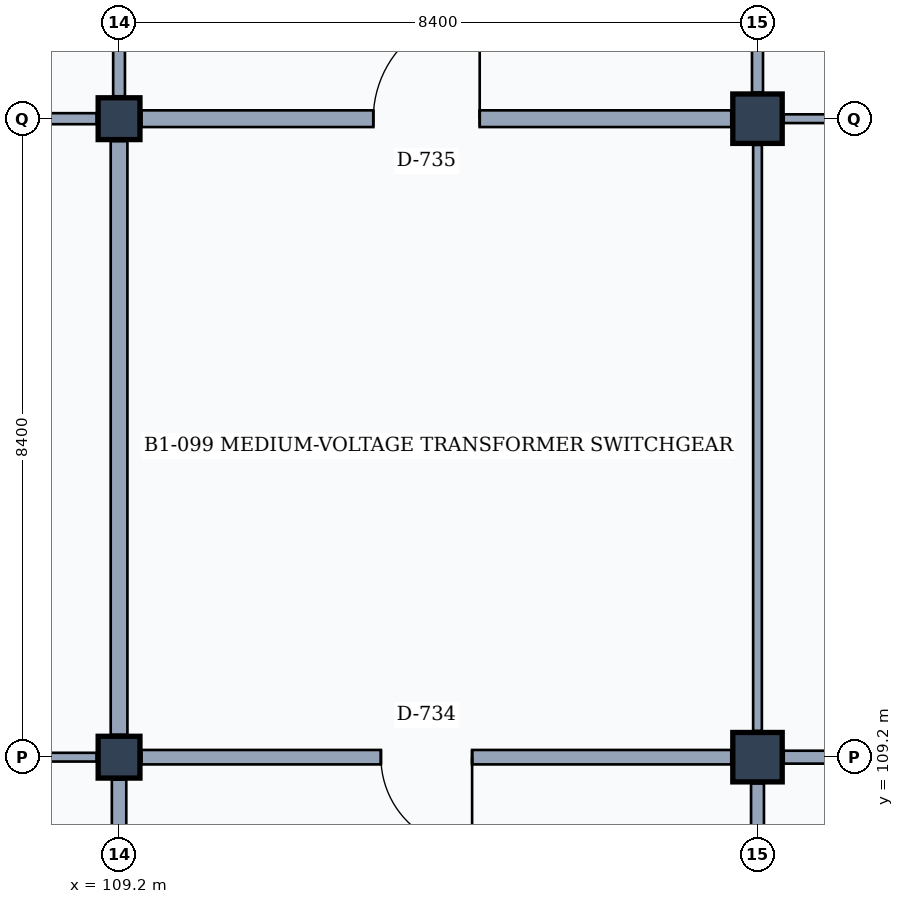
"""IFC4 building model, lengths in metres.
Left out: names, types, materials, properties, quantities, classifications, styles, units other than length and angle.
Written with IfcOpenShell. Run it as: python <this file> out.ifc"""

import sys

from ifc_helpers import new_model, si_unit, direction, frame, frame_2d, origin, origin_2d, place, context, subcontext, project, spatial, rectangle, extrude, element, fill, save


model = new_model("IFC4")
c1 = context("Model", 3, precision=1e-05, world=origin(), true_north=direction((0.0, 1.0)))
c2 = subcontext(c1, "Body", "Model", "MODEL_VIEW")
j1 = project(units=[si_unit("LENGTHUNIT", "METRE"), si_unit("PLANEANGLEUNIT", "RADIAN")], contexts=[c1])
p1 = place(None, origin())
s1 = spatial("IfcSite", under=j1, at=p1, CompositionType="ELEMENT")
p2 = place(p1, origin())
s2 = spatial("IfcBuilding", under=s1, at=p2, CompositionType="ELEMENT")
p3 = place(p2, frame((0.0, 0.0, -4.2)))
s3 = spatial("IfcBuildingStorey", under=s2, at=p3, CompositionType="ELEMENT", Elevation=-4.2)
for number, where, z_axis, x_axis in (
    (1, (109.2, 109.2, 0.0), (0.0, 0.0, 1.0), (1.0, 0.0, 0.0)),
    (2, (109.2, 117.6, 0.0), (0.0, 0.0, 1.0), (1.0, 0.0, 0.0)),
):
    element("IfcColumn", number, at=place(p3, frame(where, z_axis=z_axis, x_axis=x_axis)), inside=s3, PredefinedType="COLUMN", context=c2, shape_type="SweptSolid", body=[
        extrude(rectangle(XDim=0.55, YDim=0.55, at=origin_2d()), origin(), (0.0, 0.0, 1.0), 4.2),
    ])
for number, where, z_axis, x_axis in (
    (3, (117.6, 109.2, 0.0), (0.0, 0.0, 1.0), (1.0, 0.0, 0.0)),
    (4, (117.6, 117.6, 0.0), (0.0, 0.0, 1.0), (1.0, 0.0, 0.0)),
):
    element("IfcColumn", number, at=place(p3, frame(where, z_axis=z_axis, x_axis=x_axis)), inside=s3, PredefinedType="COLUMN", context=c2, shape_type="SweptSolid", body=[
        extrude(rectangle(XDim=0.65, YDim=0.65, at=origin_2d()), origin(), (0.0, 0.0, 1.0), 4.2),
    ])
p4 = place(p3, frame((109.2, 101.095, 0.0), z_axis=(0.0, 0.0, 1.0), x_axis=(0.0, 1.0, 0.0)))
e5 = element("IfcWall", 5, at=p4, inside=s3, PredefinedType="PARTITIONING", context=c2, shape_type="SweptSolid", body=[
    extrude(rectangle(XDim=7.81, YDim=0.19, at=frame_2d((3.905, 0.0))), origin(), (0.0, 0.0, 1.0), 3.23),
])
p5 = place(p4, frame((3.3, 0.0, 0.0)))
e6 = element("IfcOpeningElement", 6, at=p5, cuts=e5, PredefinedType="OPENING", context=c2, shape_type="SweptSolid", body=[
    extrude(rectangle(XDim=0.9, YDim=2.1, at=frame_2d((0.45, 1.05))), frame((0.0, 0.105, 0.0), z_axis=(0.0, -1.0, 0.0), x_axis=(1.0, 0.0, 0.0)), (0.0, 0.0, 1.0), 0.21),
])
p6 = place(p3, frame((101.095, 109.2, 0.0), z_axis=(0.0, 0.0, 1.0), x_axis=(1.0, 0.0, 0.0)))
e7 = element("IfcWall", 7, at=p6, inside=s3, PredefinedType="PARTITIONING", context=c2, shape_type="SweptSolid", body=[
    extrude(rectangle(XDim=7.81, YDim=0.115, at=frame_2d((3.905, 0.0))), origin(), (0.0, 0.0, 1.0), 2.93),
])
p7 = place(p6, frame((3.125, 0.0, 0.0)))
e8 = element("IfcOpeningElement", 8, at=p7, cuts=e7, PredefinedType="OPENING", context=c2, shape_type="SweptSolid", body=[
    extrude(rectangle(XDim=1.25, YDim=2.3, at=frame_2d((0.625, 1.15))), frame((0.0, 0.067, 0.0), z_axis=(0.0, -1.0, 0.0), x_axis=(1.0, 0.0, 0.0)), (0.0, 0.0, 1.0), 0.135),
])
p8 = place(p3, frame((109.2, 109.495, 0.0), z_axis=(0.0, 0.0, 1.0), x_axis=(0.0, 1.0, 0.0)))
e9 = element("IfcWall", 9, at=p8, inside=s3, PredefinedType="PARTITIONING", context=c2, shape_type="SweptSolid", body=[
    extrude(rectangle(XDim=7.81, YDim=0.22, at=frame_2d((3.905, 0.0))), origin(), (0.0, 0.0, 1.0), 3.23),
])
p9 = place(p3, frame((101.095, 117.6, 0.0), z_axis=(0.0, 0.0, 1.0), x_axis=(1.0, 0.0, 0.0)))
e10 = element("IfcWall", 10, at=p9, inside=s3, PredefinedType="PARTITIONING", context=c2, shape_type="SweptSolid", body=[
    extrude(rectangle(XDim=7.81, YDim=0.145, at=frame_2d((3.905, 0.0))), origin(), (0.0, 0.0, 1.0), 2.93),
])
p10 = place(p9, frame((3.075, 0.0, 0.0)))
e11 = element("IfcOpeningElement", 11, at=p10, cuts=e10, PredefinedType="OPENING", context=c2, shape_type="SweptSolid", body=[
    extrude(rectangle(XDim=1.35, YDim=2.25, at=frame_2d((0.675, 1.125))), frame((0.0, 0.083, 0.0), z_axis=(0.0, -1.0, 0.0), x_axis=(1.0, 0.0, 0.0)), (0.0, 0.0, 1.0), 0.165),
])
p11 = place(p3, frame((109.2, 117.895, 0.0), z_axis=(0.0, 0.0, 1.0), x_axis=(0.0, 1.0, 0.0)))
e12 = element("IfcWall", 12, at=p11, inside=s3, PredefinedType="PARTITIONING", context=c2, shape_type="SweptSolid", body=[
    extrude(rectangle(XDim=7.81, YDim=0.155, at=frame_2d((3.905, 0.0))), origin(), (0.0, 0.0, 1.0), 3.23),
])
p12 = place(p3, frame((117.6, 101.145, 0.0), z_axis=(0.0, 0.0, 1.0), x_axis=(0.0, 1.0, 0.0)))
e13 = element("IfcWall", 13, at=p12, inside=s3, PredefinedType="PARTITIONING", context=c2, shape_type="SweptSolid", body=[
    extrude(rectangle(XDim=7.71, YDim=0.17, at=frame_2d((3.855, 0.0))), origin(), (0.0, 0.0, 1.0), 3.23),
])
p13 = place(p3, frame((109.495, 109.2, 0.0), z_axis=(0.0, 0.0, 1.0), x_axis=(1.0, 0.0, 0.0)))
e14 = element("IfcWall", 14, at=p13, inside=s3, PredefinedType="PARTITIONING", context=c2, shape_type="SweptSolid", body=[
    extrude(rectangle(XDim=7.76, YDim=0.19, at=frame_2d((3.88, 0.0))), origin(), (0.0, 0.0, 1.0), 2.93),
])
p14 = place(p13, frame((3.15, 0.0, 0.0)))
e15 = element("IfcOpeningElement", 15, at=p14, cuts=e14, PredefinedType="OPENING", context=c2, shape_type="SweptSolid", body=[
    extrude(rectangle(XDim=1.2, YDim=2.2, at=frame_2d((0.6, 1.1))), frame((0.0, 0.105, 0.0), z_axis=(0.0, -1.0, 0.0), x_axis=(1.0, 0.0, 0.0)), (0.0, 0.0, 1.0), 0.21),
])
p15 = place(p3, frame((117.6, 109.545, 0.0), z_axis=(0.0, 0.0, 1.0), x_axis=(0.0, 1.0, 0.0)))
e16 = element("IfcWall", 16, at=p15, inside=s3, PredefinedType="PARTITIONING", context=c2, shape_type="SweptSolid", body=[
    extrude(rectangle(XDim=7.71, YDim=0.115, at=frame_2d((3.855, 0.0))), origin(), (0.0, 0.0, 1.0), 3.23),
])
p16 = place(p3, frame((109.495, 117.6, 0.0), z_axis=(0.0, 0.0, 1.0), x_axis=(1.0, 0.0, 0.0)))
e17 = element("IfcWall", 17, at=p16, inside=s3, PredefinedType="PARTITIONING", context=c2, shape_type="SweptSolid", body=[
    extrude(rectangle(XDim=7.76, YDim=0.22, at=frame_2d((3.88, 0.0))), origin(), (0.0, 0.0, 1.0), 2.93),
])
p17 = place(p16, frame((3.05, 0.0, 0.0)))
e18 = element("IfcOpeningElement", 18, at=p17, cuts=e17, PredefinedType="OPENING", context=c2, shape_type="SweptSolid", body=[
    extrude(rectangle(XDim=1.4, YDim=2.25, at=frame_2d((0.7, 1.125))), frame((0.0, 0.12, 0.0), z_axis=(0.0, -1.0, 0.0), x_axis=(1.0, 0.0, 0.0)), (0.0, 0.0, 1.0), 0.24),
])
p18 = place(p3, frame((117.6, 117.945, 0.0), z_axis=(0.0, 0.0, 1.0), x_axis=(0.0, 1.0, 0.0)))
e19 = element("IfcWall", 19, at=p18, inside=s3, PredefinedType="PARTITIONING", context=c2, shape_type="SweptSolid", body=[
    extrude(rectangle(XDim=7.71, YDim=0.145, at=frame_2d((3.855, 0.0))), origin(), (0.0, 0.0, 1.0), 3.23),
])
p19 = place(p3, frame((117.945, 109.2, 0.0), z_axis=(0.0, 0.0, 1.0), x_axis=(1.0, 0.0, 0.0)))
e20 = element("IfcWall", 20, at=p19, inside=s3, PredefinedType="PARTITIONING", context=c2, shape_type="SweptSolid", body=[
    extrude(rectangle(XDim=7.71, YDim=0.17, at=frame_2d((3.855, 0.0))), origin(), (0.0, 0.0, 1.0), 2.93),
])
p20 = place(p19, frame((2.9, 0.0, 0.0)))
e21 = element("IfcOpeningElement", 21, at=p20, cuts=e20, PredefinedType="OPENING", context=c2, shape_type="SweptSolid", body=[
    extrude(rectangle(XDim=1.7, YDim=2.3, at=frame_2d((0.85, 1.15))), frame((0.0, 0.095, 0.0), z_axis=(0.0, -1.0, 0.0), x_axis=(1.0, 0.0, 0.0)), (0.0, 0.0, 1.0), 0.19),
])
p21 = place(p3, frame((117.945, 117.6, 0.0), z_axis=(0.0, 0.0, 1.0), x_axis=(1.0, 0.0, 0.0)))
e22 = element("IfcWall", 22, at=p21, inside=s3, PredefinedType="PARTITIONING", context=c2, shape_type="SweptSolid", body=[
    extrude(rectangle(XDim=7.71, YDim=0.115, at=frame_2d((3.855, 0.0))), origin(), (0.0, 0.0, 1.0), 2.93),
])
p22 = place(p21, frame((2.8, 0.0, 0.0)))
e23 = element("IfcOpeningElement", 23, at=p22, cuts=e22, PredefinedType="OPENING", context=c2, shape_type="SweptSolid", body=[
    extrude(rectangle(XDim=1.9, YDim=2.4, at=frame_2d((0.95, 1.2))), frame((0.0, 0.067, 0.0), z_axis=(0.0, -1.0, 0.0), x_axis=(1.0, 0.0, 0.0)), (0.0, 0.0, 1.0), 0.135),
])
p23 = place(p14, frame((1.2, 0.0, 0.0), z_axis=(0.0, 0.0, 1.0), x_axis=(-1.0, 0.0, 0.0)))
e24 = element("IfcDoor", 24, at=p23, inside=s3, OperationType="SINGLE_SWING_LEFT", PredefinedType="DOOR", context=c2, shape_type="SweptSolid", body=[
    extrude(rectangle(XDim=1.2, YDim=2.2, at=frame_2d((0.6, 1.1))), frame((0.0, 0.025, 0.0), z_axis=(0.0, -1.0, 0.0), x_axis=(1.0, 0.0, 0.0)), (0.0, 0.0, 1.0), 0.05),
])
fill(e15, e24)
p24 = place(p17, origin())
e25 = element("IfcDoor", 25, at=p24, inside=s3, OperationType="SINGLE_SWING_RIGHT", PredefinedType="DOOR", context=c2, shape_type="SweptSolid", body=[
    extrude(rectangle(XDim=1.4, YDim=2.25, at=frame_2d((0.7, 1.125))), frame((0.0, 0.025, 0.0), z_axis=(0.0, -1.0, 0.0), x_axis=(1.0, 0.0, 0.0)), (0.0, 0.0, 1.0), 0.05),
])
fill(e18, e25)
save(model, sys.argv[1])
